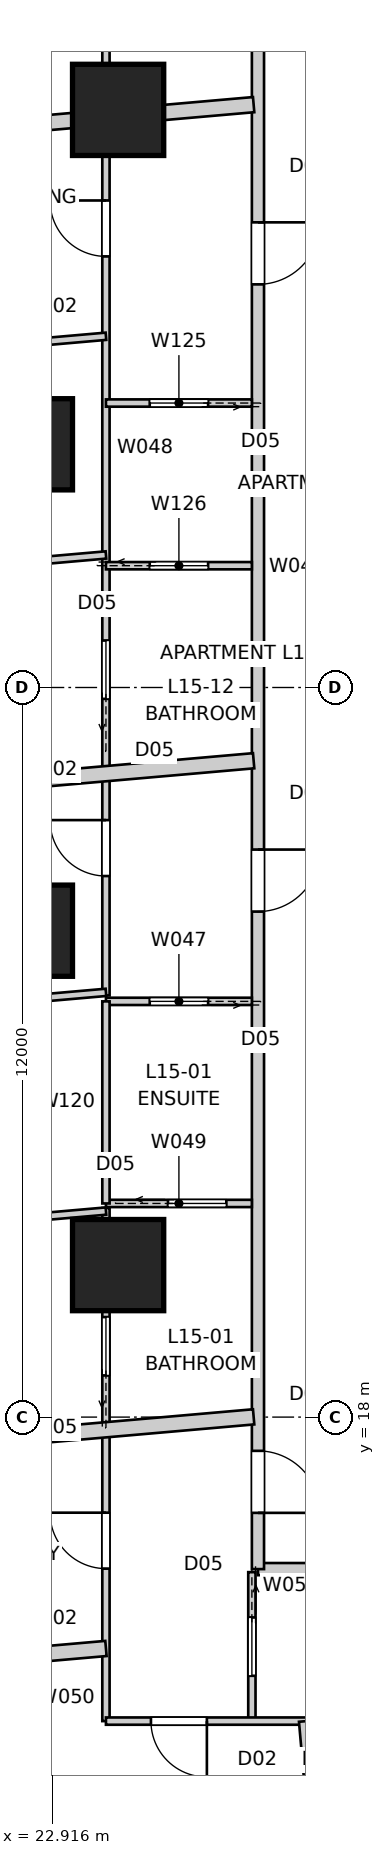
"""IFC4 building model, lengths in metres.
Left out: names, types, materials, properties, quantities, classifications, styles, units other than length and angle.
Written with IfcOpenShell. Run it as: python <this file> out.ifc"""

import sys

from ifc_helpers import new_model, si_unit, direction, frame, frame_2d, origin, origin_2d, place, context, subcontext, project, spatial, rectangle, extrude, element, fill, save


model = new_model("IFC4")
c1 = context("Model", 3, precision=1e-05, world=origin(), true_north=direction((0.0, 1.0)))
c2 = subcontext(c1, "Body", "Model", "MODEL_VIEW")
j1 = project(units=[si_unit("LENGTHUNIT", "METRE"), si_unit("PLANEANGLEUNIT", "RADIAN")], contexts=[c1])
p1 = place(None, origin())
s1 = spatial("IfcSite", under=j1, at=p1, CompositionType="ELEMENT")
p2 = place(p1, origin())
s2 = spatial("IfcBuilding", under=s1, at=p2, CompositionType="ELEMENT")
p3 = place(p2, frame((0.0, 0.0, 57.4)))
s3 = spatial("IfcBuildingStorey", under=s2, at=p3, CompositionType="ELEMENT", Elevation=57.4)
for number, where, z_axis, x_axis in (
    (1, (24.0, 39.5, 0.0), (0.0, 0.0, 1.0), (1.0, 0.0, 0.0)),
    (2, (22.5, 34.0, 0.0), (0.0, 0.0, 1.0), (1.0, 0.0, 0.0)),
    (3, (22.5, 26.0, 0.0), (0.0, 0.0, 1.0), (1.0, 0.0, 0.0)),
    (4, (24.0, 20.5, 0.0), (0.0, 0.0, 1.0), (1.0, 0.0, 0.0)),
):
    element("IfcColumn", number, at=place(p3, frame(where, z_axis=z_axis, x_axis=x_axis)), inside=s3, PredefinedType="COLUMN", context=c2, shape_type="SweptSolid", body=[
        extrude(rectangle(XDim=1.5, YDim=1.5, at=origin_2d()), origin(), (0.0, 0.0, 1.0), 3.4),
    ])
p4 = place(p3, frame((26.3, 15.5, 0.0), z_axis=(0.0, 0.0, 1.0), x_axis=(1.0, 0.0, 0.0)))
e5 = element("IfcWall", 5, at=p4, inside=s3, PredefinedType="PARTITIONING", context=c2, shape_type="SweptSolid", body=[
    extrude(rectangle(XDim=27.4, YDim=0.2, at=frame_2d((13.7, 0.0))), origin(), (0.0, 0.0, 1.0), 3.25),
])
p5 = place(p4, frame((18.776, 0.0, 0.0)))
e6 = element("IfcOpeningElement", 6, at=p5, cuts=e5, PredefinedType="OPENING", context=c2, shape_type="SweptSolid", body=[
    extrude(rectangle(XDim=1.02, YDim=2.34, at=frame_2d((0.51, 1.17))), frame((0.0, 0.11, 0.0), z_axis=(0.0, -1.0, 0.0), x_axis=(1.0, 0.0, 0.0)), (0.0, 0.0, 1.0), 0.22),
])
p6 = place(p4, frame((5.793, 0.0, 0.0)))
e7 = element("IfcOpeningElement", 7, at=p6, cuts=e5, PredefinedType="OPENING", context=c2, shape_type="SweptSolid", body=[
    extrude(rectangle(XDim=1.02, YDim=2.34, at=frame_2d((0.51, 1.17))), frame((0.0, 0.11, 0.0), z_axis=(0.0, -1.0, 0.0), x_axis=(1.0, 0.0, 0.0)), (0.0, 0.0, 1.0), 0.22),
])
p7 = place(p3, frame((26.3, 44.5, 0.0), z_axis=(0.0, 0.0, 1.0), x_axis=(0.0, -1.0, 0.0)))
e8 = element("IfcWall", 8, at=p7, inside=s3, PredefinedType="PARTITIONING", context=c2, shape_type="SweptSolid", body=[
    extrude(rectangle(XDim=29.0, YDim=0.2, at=frame_2d((14.5, 0.0))), origin(), (0.0, 0.0, 1.0), 3.25),
])
p8 = place(p7, frame((6.85, 0.0, 0.0)))
e9 = element("IfcOpeningElement", 9, at=p8, cuts=e8, PredefinedType="OPENING", context=c2, shape_type="SweptSolid", body=[
    extrude(rectangle(XDim=1.02, YDim=2.34, at=frame_2d((0.51, 1.17))), frame((0.0, 0.11, 0.0), z_axis=(0.0, -1.0, 0.0), x_axis=(1.0, 0.0, 0.0)), (0.0, 0.0, 1.0), 0.22),
])
p9 = place(p7, frame((2.345, 0.0, 0.0)))
e10 = element("IfcOpeningElement", 10, at=p9, cuts=e8, PredefinedType="OPENING", context=c2, shape_type="SweptSolid", body=[
    extrude(rectangle(XDim=1.02, YDim=2.1, at=frame_2d((0.51, 1.05))), frame((0.0, 0.11, 0.0), z_axis=(0.0, -1.0, 0.0), x_axis=(1.0, 0.0, 0.0)), (0.0, 0.0, 1.0), 0.22),
])
p10 = place(p7, frame((17.166, 0.0, 0.0)))
e11 = element("IfcOpeningElement", 11, at=p10, cuts=e8, PredefinedType="OPENING", context=c2, shape_type="SweptSolid", body=[
    extrude(rectangle(XDim=1.02, YDim=2.34, at=frame_2d((0.51, 1.17))), frame((0.0, 0.11, 0.0), z_axis=(0.0, -1.0, 0.0), x_axis=(1.0, 0.0, 0.0)), (0.0, 0.0, 1.0), 0.22),
])
p11 = place(p7, frame((27.055, 0.0, 0.0)))
e12 = element("IfcOpeningElement", 12, at=p11, cuts=e8, PredefinedType="OPENING", context=c2, shape_type="SweptSolid", body=[
    extrude(rectangle(XDim=1.02, YDim=2.34, at=frame_2d((0.51, 1.17))), frame((0.0, 0.11, 0.0), z_axis=(0.0, -1.0, 0.0), x_axis=(1.0, 0.0, 0.0)), (0.0, 0.0, 1.0), 0.22),
])
p12 = place(p3, frame((13.66, 38.487, 0.0), z_axis=(0.0, 0.0, 1.0), x_axis=(0.996194851608, 0.087153988028, 0.0)))
e13 = element("IfcWall", 13, at=p12, inside=s3, PredefinedType="PARTITIONING", context=c2, shape_type="SweptSolid", body=[
    extrude(rectangle(XDim=12.617, YDim=0.25, at=frame_2d((6.309, 0.0))), origin(), (0.0, 0.0, 1.0), 3.25),
])
p13 = place(p3, frame((15.534, 17.068, 0.0), z_axis=(0.0, 0.0, 1.0), x_axis=(0.996193939644, 0.08716441141, 0.0)))
e14 = element("IfcWall", 14, at=p13, inside=s3, PredefinedType="PARTITIONING", context=c2, shape_type="SweptSolid", body=[
    extrude(rectangle(XDim=10.736, YDim=0.25, at=frame_2d((5.368, 0.0))), origin(), (0.0, 0.0, 1.0), 3.25),
])
p14 = place(p3, frame((14.597, 27.778, 0.0), z_axis=(0.0, 0.0, 1.0), x_axis=(0.996195419442, 0.087147497287, 0.0)))
e15 = element("IfcWall", 15, at=p14, inside=s3, PredefinedType="PARTITIONING", context=c2, shape_type="SweptSolid", body=[
    extrude(rectangle(XDim=11.677, YDim=0.25, at=frame_2d((5.838, 0.0))), origin(), (0.0, 0.0, 1.0), 3.25),
])
p15 = place(p3, frame((26.2, 24.838, 0.0), z_axis=(0.0, 0.0, 1.0), x_axis=(-1.0, 0.0, 0.0)))
e16 = element("IfcWall", 16, at=p15, inside=s3, PredefinedType="PARTITIONING", context=c2, shape_type="SweptSolid", body=[
    extrude(rectangle(XDim=2.4, YDim=0.12, at=frame_2d((1.2, 0.0))), origin(), (0.0, 0.0, 1.0), 3.25),
])
p16 = place(p15, frame((0.72, 0.0, 0.0)))
e17 = element("IfcOpeningElement", 17, at=p16, cuts=e16, PredefinedType="OPENING", context=c2, shape_type="SweptSolid", body=[
    extrude(rectangle(XDim=0.96, YDim=2.1, at=frame_2d((0.48, 1.05))), frame((0.0, 0.07, 0.0), z_axis=(0.0, -1.0, 0.0), x_axis=(1.0, 0.0, 0.0)), (0.0, 0.0, 1.0), 0.14),
])
p17 = place(p3, frame((23.8, 24.936, 0.0), z_axis=(0.0, 0.0, 1.0), x_axis=(0.0, 1.0, 0.0)))
e18 = element("IfcWall", 18, at=p17, inside=s3, PredefinedType="PARTITIONING", context=c2, shape_type="SweptSolid", body=[
    extrude(rectangle(XDim=22.064, YDim=0.12, at=frame_2d((11.032, 0.0))), origin(), (0.0, 0.0, 1.0), 2.549),
])
p18 = place(p17, frame((12.155, 0.0, 0.0)))
e19 = element("IfcOpeningElement", 19, at=p18, cuts=e18, PredefinedType="OPENING", context=c2, shape_type="SweptSolid", body=[
    extrude(rectangle(XDim=0.92, YDim=2.34, at=frame_2d((0.46, 1.17))), frame((0.0, 0.07, 0.0), z_axis=(0.0, -1.0, 0.0), x_axis=(1.0, 0.0, 0.0)), (0.0, 0.0, 1.0), 0.14),
])
p19 = place(p17, frame((16.136, 0.0, 0.0)))
e20 = element("IfcOpeningElement", 20, at=p19, cuts=e18, PredefinedType="OPENING", context=c2, shape_type="SweptSolid", body=[
    extrude(rectangle(XDim=0.92, YDim=2.34, at=frame_2d((0.46, 1.17))), frame((0.0, 0.07, 0.0), z_axis=(0.0, -1.0, 0.0), x_axis=(1.0, 0.0, 0.0)), (0.0, 0.0, 1.0), 0.14),
])
p20 = place(p17, frame((1.964, 0.0, 0.0)))
e21 = element("IfcOpeningElement", 21, at=p20, cuts=e18, PredefinedType="OPENING", context=c2, shape_type="SweptSolid", body=[
    extrude(rectangle(XDim=0.92, YDim=2.34, at=frame_2d((0.46, 1.17))), frame((0.0, 0.07, 0.0), z_axis=(0.0, -1.0, 0.0), x_axis=(1.0, 0.0, 0.0)), (0.0, 0.0, 1.0), 0.14),
])
p21 = place(p17, frame((4.877, 0.0, 0.0)))
e22 = element("IfcOpeningElement", 22, at=p21, cuts=e18, PredefinedType="OPENING", context=c2, shape_type="SweptSolid", body=[
    extrude(rectangle(XDim=0.96, YDim=2.1, at=frame_2d((0.48, 1.05))), frame((0.0, 0.07, 0.0), z_axis=(0.0, -1.0, 0.0), x_axis=(1.0, 0.0, 0.0)), (0.0, 0.0, 1.0), 0.14),
])
p22 = place(p3, frame((23.8, 21.514, 0.0), z_axis=(0.0, 0.0, 1.0), x_axis=(1.0, 0.0, 0.0)))
e23 = element("IfcWall", 23, at=p22, inside=s3, PredefinedType="PARTITIONING", context=c2, shape_type="SweptSolid", body=[
    extrude(rectangle(XDim=2.4, YDim=0.12, at=frame_2d((1.2, 0.0))), origin(), (0.0, 0.0, 1.0), 3.25),
])
p23 = place(p22, frame((1.02, 0.0, 0.0)))
e24 = element("IfcOpeningElement", 24, at=p23, cuts=e23, PredefinedType="OPENING", context=c2, shape_type="SweptSolid", body=[
    extrude(rectangle(XDim=0.96, YDim=2.1, at=frame_2d((0.48, 1.05))), frame((0.0, 0.07, 0.0), z_axis=(0.0, -1.0, 0.0), x_axis=(1.0, 0.0, 0.0)), (0.0, 0.0, 1.0), 0.14),
])
p24 = place(p3, frame((23.8, 13.0, 0.0), z_axis=(0.0, 0.0, 1.0), x_axis=(0.0, 1.0, 0.0)))
e25 = element("IfcWall", 25, at=p24, inside=s3, PredefinedType="PARTITIONING", context=c2, shape_type="SweptSolid", body=[
    extrude(rectangle(XDim=8.439, YDim=0.12, at=frame_2d((4.219, 0.0))), origin(), (0.0, 0.0, 1.0), 2.549),
])
p25 = place(p24, frame((2.508, 0.0, 0.0)))
e26 = element("IfcOpeningElement", 26, at=p25, cuts=e25, PredefinedType="OPENING", context=c2, shape_type="SweptSolid", body=[
    extrude(rectangle(XDim=0.92, YDim=2.34, at=frame_2d((0.46, 1.17))), frame((0.0, 0.07, 0.0), z_axis=(0.0, -1.0, 0.0), x_axis=(1.0, 0.0, 0.0)), (0.0, 0.0, 1.0), 0.14),
])
p26 = place(p24, frame((5.685, 0.0, 0.0)))
e27 = element("IfcOpeningElement", 27, at=p26, cuts=e25, PredefinedType="OPENING", context=c2, shape_type="SweptSolid", body=[
    extrude(rectangle(XDim=0.96, YDim=2.1, at=frame_2d((0.48, 1.05))), frame((0.0, 0.07, 0.0), z_axis=(0.0, -1.0, 0.0), x_axis=(1.0, 0.0, 0.0)), (0.0, 0.0, 1.0), 0.14),
])
p27 = place(p3, frame((23.8, 21.514, 0.0), z_axis=(0.0, 0.0, 1.0), x_axis=(0.0, 1.0, 0.0)))
e28 = element("IfcWall", 28, at=p27, inside=s3, PredefinedType="PARTITIONING", context=c2, shape_type="SweptSolid", body=[
    extrude(rectangle(XDim=3.324, YDim=0.12, at=frame_2d((1.662, 0.0))), origin(), (0.0, 0.0, 1.0), 3.25),
])
p28 = place(p3, frame((23.8, 24.986, 0.0), z_axis=(0.0, 0.0, 1.0), x_axis=(-0.996194045583, -0.087163200634, 0.0)))
e29 = element("IfcWall", 29, at=p28, inside=s3, PredefinedType="PARTITIONING", context=c2, shape_type="SweptSolid", body=[
    extrude(rectangle(XDim=8.885, YDim=0.12, at=frame_2d((4.442, 0.0))), origin(), (0.0, 0.0, 1.0), 3.25),
])
p29 = place(p28, frame((4.002, 0.0, 0.0)))
e30 = element("IfcOpeningElement", 30, at=p29, cuts=e29, PredefinedType="OPENING", context=c2, shape_type="SweptSolid", body=[
    extrude(rectangle(XDim=0.92, YDim=2.34, at=frame_2d((0.46, 1.17))), frame((0.0, 0.07, 0.0), z_axis=(0.0, -1.0, 0.0), x_axis=(1.0, 0.0, 0.0)), (0.0, 0.0, 1.0), 0.14),
])
p30 = place(p3, frame((23.8, 21.389, 0.0), z_axis=(0.0, 0.0, 1.0), x_axis=(-0.996194273991, -0.087160590107, 0.0)))
e31 = element("IfcWall", 31, at=p30, inside=s3, PredefinedType="PARTITIONING", context=c2, shape_type="SweptSolid", body=[
    extrude(rectangle(XDim=8.571, YDim=0.12, at=frame_2d((4.286, 0.0))), origin(), (0.0, 0.0, 1.0), 3.25),
])
p31 = place(p3, frame((26.2, 15.45, 0.0), z_axis=(0.0, 0.0, 1.0), x_axis=(0.0, -1.0, 0.0)))
e32 = element("IfcWall", 32, at=p31, inside=s3, PredefinedType="PARTITIONING", context=c2, shape_type="SweptSolid", body=[
    extrude(rectangle(XDim=2.45, YDim=0.12, at=frame_2d((1.225, 0.0))), origin(), (0.0, 0.0, 1.0), 3.25),
])
p32 = place(p31, frame((0.745, 0.0, 0.0)))
e33 = element("IfcOpeningElement", 33, at=p32, cuts=e32, PredefinedType="OPENING", context=c2, shape_type="SweptSolid", body=[
    extrude(rectangle(XDim=0.96, YDim=2.1, at=frame_2d((0.48, 1.05))), frame((0.0, 0.07, 0.0), z_axis=(0.0, -1.0, 0.0), x_axis=(1.0, 0.0, 0.0)), (0.0, 0.0, 1.0), 0.14),
])
p33 = place(p3, frame((30.333, 13.0, 0.0), z_axis=(0.0, 0.0, 1.0), x_axis=(-1.0, 0.0, 0.0)))
e34 = element("IfcWall", 34, at=p33, inside=s3, PredefinedType="PARTITIONING", context=c2, shape_type="SweptSolid", body=[
    extrude(rectangle(XDim=6.533, YDim=0.12, at=frame_2d((3.267, 0.0))), origin(), (0.0, 0.0, 1.0), 3.25),
])
p34 = place(p33, frame((4.873, 0.0, 0.0)))
e35 = element("IfcOpeningElement", 35, at=p34, cuts=e34, PredefinedType="OPENING", context=c2, shape_type="SweptSolid", body=[
    extrude(rectangle(XDim=0.92, YDim=2.34, at=frame_2d((0.46, 1.17))), frame((0.0, 0.07, 0.0), z_axis=(0.0, -1.0, 0.0), x_axis=(1.0, 0.0, 0.0)), (0.0, 0.0, 1.0), 0.14),
])
p35 = place(p33, frame((1.162, 0.0, 0.0)))
e36 = element("IfcOpeningElement", 36, at=p35, cuts=e34, PredefinedType="OPENING", context=c2, shape_type="SweptSolid", body=[
    extrude(rectangle(XDim=0.96, YDim=2.1, at=frame_2d((0.48, 1.05))), frame((0.0, 0.07, 0.0), z_axis=(0.0, -1.0, 0.0), x_axis=(1.0, 0.0, 0.0)), (0.0, 0.0, 1.0), 0.14),
])
p36 = place(p3, frame((16.843, 13.586, 0.0), z_axis=(0.0, 0.0, 1.0), x_axis=(0.996195462691, 0.087147002895, 0.0)))
e37 = element("IfcWall", 37, at=p36, inside=s3, PredefinedType="PARTITIONING", context=c2, shape_type="SweptSolid", body=[
    extrude(rectangle(XDim=6.984, YDim=0.25, at=frame_2d((3.492, 0.0))), origin(), (0.0, 0.0, 1.0), 2.638),
])
p37 = place(p36, frame((1.548, 0.0, 0.0)))
e38 = element("IfcOpeningElement", 38, at=p37, cuts=e37, PredefinedType="OPENING", context=c2, shape_type="SweptSolid", body=[
    extrude(rectangle(XDim=0.92, YDim=2.34, at=frame_2d((0.46, 1.17))), frame((0.0, 0.135, 0.0), z_axis=(0.0, -1.0, 0.0), x_axis=(1.0, 0.0, 0.0)), (0.0, 0.0, 1.0), 0.27),
])
p38 = place(p3, frame((27.099, 13.0, 0.0), z_axis=(0.0, 0.0, 1.0), x_axis=(0.087158236544, -0.99619447991, 0.0)))
e39 = element("IfcWall", 39, at=p38, inside=s3, PredefinedType="PARTITIONING", context=c2, shape_type="SweptSolid", body=[
    extrude(rectangle(XDim=8.689, YDim=0.25, at=frame_2d((4.344, 0.0))), origin(), (0.0, 0.0, 1.0), 2.638),
])
p39 = place(p3, frame((26.2, 34.678, 0.0), z_axis=(0.0, 0.0, 1.0), x_axis=(-1.0, 0.0, 0.0)))
e40 = element("IfcWall", 40, at=p39, inside=s3, PredefinedType="PARTITIONING", context=c2, shape_type="SweptSolid", body=[
    extrude(rectangle(XDim=2.4, YDim=0.12, at=frame_2d((1.2, 0.0))), origin(), (0.0, 0.0, 1.0), 3.25),
])
p40 = place(p39, frame((0.72, 0.0, 0.0)))
e41 = element("IfcOpeningElement", 41, at=p40, cuts=e40, PredefinedType="OPENING", context=c2, shape_type="SweptSolid", body=[
    extrude(rectangle(XDim=0.96, YDim=2.1, at=frame_2d((0.48, 1.05))), frame((0.0, 0.07, 0.0), z_axis=(0.0, -1.0, 0.0), x_axis=(1.0, 0.0, 0.0)), (0.0, 0.0, 1.0), 0.14),
])
p41 = place(p3, frame((23.8, 32.003, 0.0), z_axis=(0.0, 0.0, 1.0), x_axis=(1.0, 0.0, 0.0)))
e42 = element("IfcWall", 42, at=p41, inside=s3, PredefinedType="PARTITIONING", context=c2, shape_type="SweptSolid", body=[
    extrude(rectangle(XDim=2.4, YDim=0.12, at=frame_2d((1.2, 0.0))), origin(), (0.0, 0.0, 1.0), 3.25),
])
p42 = place(p41, frame((0.72, 0.0, 0.0)))
e43 = element("IfcOpeningElement", 43, at=p42, cuts=e42, PredefinedType="OPENING", context=c2, shape_type="SweptSolid", body=[
    extrude(rectangle(XDim=0.96, YDim=2.1, at=frame_2d((0.48, 1.05))), frame((0.0, 0.07, 0.0), z_axis=(0.0, -1.0, 0.0), x_axis=(1.0, 0.0, 0.0)), (0.0, 0.0, 1.0), 0.14),
])
p43 = place(p3, frame((23.8, 35.777, 0.0), z_axis=(0.0, 0.0, 1.0), x_axis=(-0.996195794011, -0.087143215425, 0.0)))
e44 = element("IfcWall", 44, at=p43, inside=s3, PredefinedType="PARTITIONING", context=c2, shape_type="SweptSolid", body=[
    extrude(rectangle(XDim=9.825, YDim=0.12, at=frame_2d((4.913, 0.0))), origin(), (0.0, 0.0, 1.0), 2.796),
])
p44 = place(p43, frame((4.473, 0.0, 0.0)))
e45 = element("IfcOpeningElement", 45, at=p44, cuts=e44, PredefinedType="OPENING", context=c2, shape_type="SweptSolid", body=[
    extrude(rectangle(XDim=0.92, YDim=2.34, at=frame_2d((0.46, 1.17))), frame((0.0, 0.07, 0.0), z_axis=(0.0, -1.0, 0.0), x_axis=(1.0, 0.0, 0.0)), (0.0, 0.0, 1.0), 0.14),
])
p45 = place(p3, frame((23.8, 32.18, 0.0), z_axis=(0.0, 0.0, 1.0), x_axis=(-0.996193828936, -0.087165676674, 0.0)))
e46 = element("IfcWall", 46, at=p45, inside=s3, PredefinedType="PARTITIONING", context=c2, shape_type="SweptSolid", body=[
    extrude(rectangle(XDim=9.512, YDim=0.12, at=frame_2d((4.756, 0.0))), origin(), (0.0, 0.0, 1.0), 3.25),
])
p46 = place(p8, origin())
e47 = element("IfcDoor", 47, at=p46, inside=s3, OperationType="SINGLE_SWING_LEFT", PredefinedType="DOOR", context=c2, shape_type="SweptSolid", body=[
    extrude(rectangle(XDim=1.02, YDim=2.34, at=frame_2d((0.51, 1.17))), frame((0.0, 0.025, 0.0), z_axis=(0.0, -1.0, 0.0), x_axis=(1.0, 0.0, 0.0)), (0.0, 0.0, 1.0), 0.05),
])
fill(e9, e47)
p47 = place(p10, origin())
e48 = element("IfcDoor", 48, at=p47, inside=s3, OperationType="SINGLE_SWING_LEFT", PredefinedType="DOOR", context=c2, shape_type="SweptSolid", body=[
    extrude(rectangle(XDim=1.02, YDim=2.34, at=frame_2d((0.51, 1.17))), frame((0.0, 0.025, 0.0), z_axis=(0.0, -1.0, 0.0), x_axis=(1.0, 0.0, 0.0)), (0.0, 0.0, 1.0), 0.05),
])
fill(e11, e48)
p48 = place(p11, origin())
e49 = element("IfcDoor", 49, at=p48, inside=s3, OperationType="SINGLE_SWING_RIGHT", PredefinedType="DOOR", context=c2, shape_type="SweptSolid", body=[
    extrude(rectangle(XDim=1.02, YDim=2.34, at=frame_2d((0.51, 1.17))), frame((0.0, 0.025, 0.0), z_axis=(0.0, -1.0, 0.0), x_axis=(1.0, 0.0, 0.0)), (0.0, 0.0, 1.0), 0.05),
])
fill(e12, e49)
p49 = place(p18, origin())
e50 = element("IfcDoor", 50, at=p49, inside=s3, OperationType="SINGLE_SWING_RIGHT", PredefinedType="DOOR", context=c2, shape_type="SweptSolid", body=[
    extrude(rectangle(XDim=0.92, YDim=2.34, at=frame_2d((0.46, 1.17))), frame((0.0, 0.025, 0.0), z_axis=(0.0, -1.0, 0.0), x_axis=(1.0, 0.0, 0.0)), (0.0, 0.0, 1.0), 0.05),
])
fill(e19, e50)
p50 = place(p40, origin())
e51 = element("IfcDoor", 51, at=p50, inside=s3, OperationType="SLIDING_TO_LEFT", PredefinedType="DOOR", context=c2, shape_type="SweptSolid", body=[
    extrude(rectangle(XDim=0.96, YDim=2.1, at=frame_2d((0.48, 1.05))), frame((0.0, 0.025, 0.0), z_axis=(0.0, -1.0, 0.0), x_axis=(1.0, 0.0, 0.0)), (0.0, 0.0, 1.0), 0.05),
])
fill(e41, e51)
p51 = place(p20, origin())
e52 = element("IfcDoor", 52, at=p51, inside=s3, OperationType="SINGLE_SWING_RIGHT", PredefinedType="DOOR", context=c2, shape_type="SweptSolid", body=[
    extrude(rectangle(XDim=0.92, YDim=2.34, at=frame_2d((0.46, 1.17))), frame((0.0, 0.025, 0.0), z_axis=(0.0, -1.0, 0.0), x_axis=(1.0, 0.0, 0.0)), (0.0, 0.0, 1.0), 0.05),
])
fill(e21, e52)
p52 = place(p16, origin())
e53 = element("IfcDoor", 53, at=p52, inside=s3, OperationType="SLIDING_TO_LEFT", PredefinedType="DOOR", context=c2, shape_type="SweptSolid", body=[
    extrude(rectangle(XDim=0.96, YDim=2.1, at=frame_2d((0.48, 1.05))), frame((0.0, 0.025, 0.0), z_axis=(0.0, -1.0, 0.0), x_axis=(1.0, 0.0, 0.0)), (0.0, 0.0, 1.0), 0.05),
])
fill(e17, e53)
p53 = place(p25, origin())
e54 = element("IfcDoor", 54, at=p53, inside=s3, OperationType="SINGLE_SWING_RIGHT", PredefinedType="DOOR", context=c2, shape_type="SweptSolid", body=[
    extrude(rectangle(XDim=0.92, YDim=2.34, at=frame_2d((0.46, 1.17))), frame((0.0, 0.025, 0.0), z_axis=(0.0, -1.0, 0.0), x_axis=(1.0, 0.0, 0.0)), (0.0, 0.0, 1.0), 0.05),
])
fill(e26, e54)
p54 = place(p32, origin())
e55 = element("IfcDoor", 55, at=p54, inside=s3, OperationType="SLIDING_TO_LEFT", PredefinedType="DOOR", context=c2, shape_type="SweptSolid", body=[
    extrude(rectangle(XDim=0.96, YDim=2.1, at=frame_2d((0.48, 1.05))), frame((0.0, 0.025, 0.0), z_axis=(0.0, -1.0, 0.0), x_axis=(1.0, 0.0, 0.0)), (0.0, 0.0, 1.0), 0.05),
])
fill(e33, e55)
p55 = place(p34, origin())
e56 = element("IfcDoor", 56, at=p55, inside=s3, OperationType="SINGLE_SWING_LEFT", PredefinedType="DOOR", context=c2, shape_type="SweptSolid", body=[
    extrude(rectangle(XDim=0.92, YDim=2.34, at=frame_2d((0.46, 1.17))), frame((0.0, 0.025, 0.0), z_axis=(0.0, -1.0, 0.0), x_axis=(1.0, 0.0, 0.0)), (0.0, 0.0, 1.0), 0.05),
])
fill(e35, e56)
p56 = place(p42, origin())
e57 = element("IfcDoor", 57, at=p56, inside=s3, OperationType="SLIDING_TO_LEFT", PredefinedType="DOOR", context=c2, shape_type="SweptSolid", body=[
    extrude(rectangle(XDim=0.96, YDim=2.1, at=frame_2d((0.48, 1.05))), frame((0.0, 0.025, 0.0), z_axis=(0.0, -1.0, 0.0), x_axis=(1.0, 0.0, 0.0)), (0.0, 0.0, 1.0), 0.05),
])
fill(e43, e57)
p57 = place(p23, origin())
e58 = element("IfcDoor", 58, at=p57, inside=s3, OperationType="SLIDING_TO_LEFT", PredefinedType="DOOR", context=c2, shape_type="SweptSolid", body=[
    extrude(rectangle(XDim=0.96, YDim=2.1, at=frame_2d((0.48, 1.05))), frame((0.0, 0.025, 0.0), z_axis=(0.0, -1.0, 0.0), x_axis=(1.0, 0.0, 0.0)), (0.0, 0.0, 1.0), 0.05),
])
fill(e24, e58)
p58 = place(p21, origin())
e59 = element("IfcDoor", 59, at=p58, inside=s3, OperationType="SLIDING_TO_LEFT", PredefinedType="DOOR", context=c2, shape_type="SweptSolid", body=[
    extrude(rectangle(XDim=0.96, YDim=2.1, at=frame_2d((0.48, 1.05))), frame((0.0, 0.025, 0.0), z_axis=(0.0, -1.0, 0.0), x_axis=(1.0, 0.0, 0.0)), (0.0, 0.0, 1.0), 0.05),
])
fill(e22, e59)
p59 = place(p26, origin())
e60 = element("IfcDoor", 60, at=p59, inside=s3, OperationType="SLIDING_TO_LEFT", PredefinedType="DOOR", context=c2, shape_type="SweptSolid", body=[
    extrude(rectangle(XDim=0.96, YDim=2.1, at=frame_2d((0.48, 1.05))), frame((0.0, 0.025, 0.0), z_axis=(0.0, -1.0, 0.0), x_axis=(1.0, 0.0, 0.0)), (0.0, 0.0, 1.0), 0.05),
])
fill(e27, e60)
save(model, sys.argv[1])
